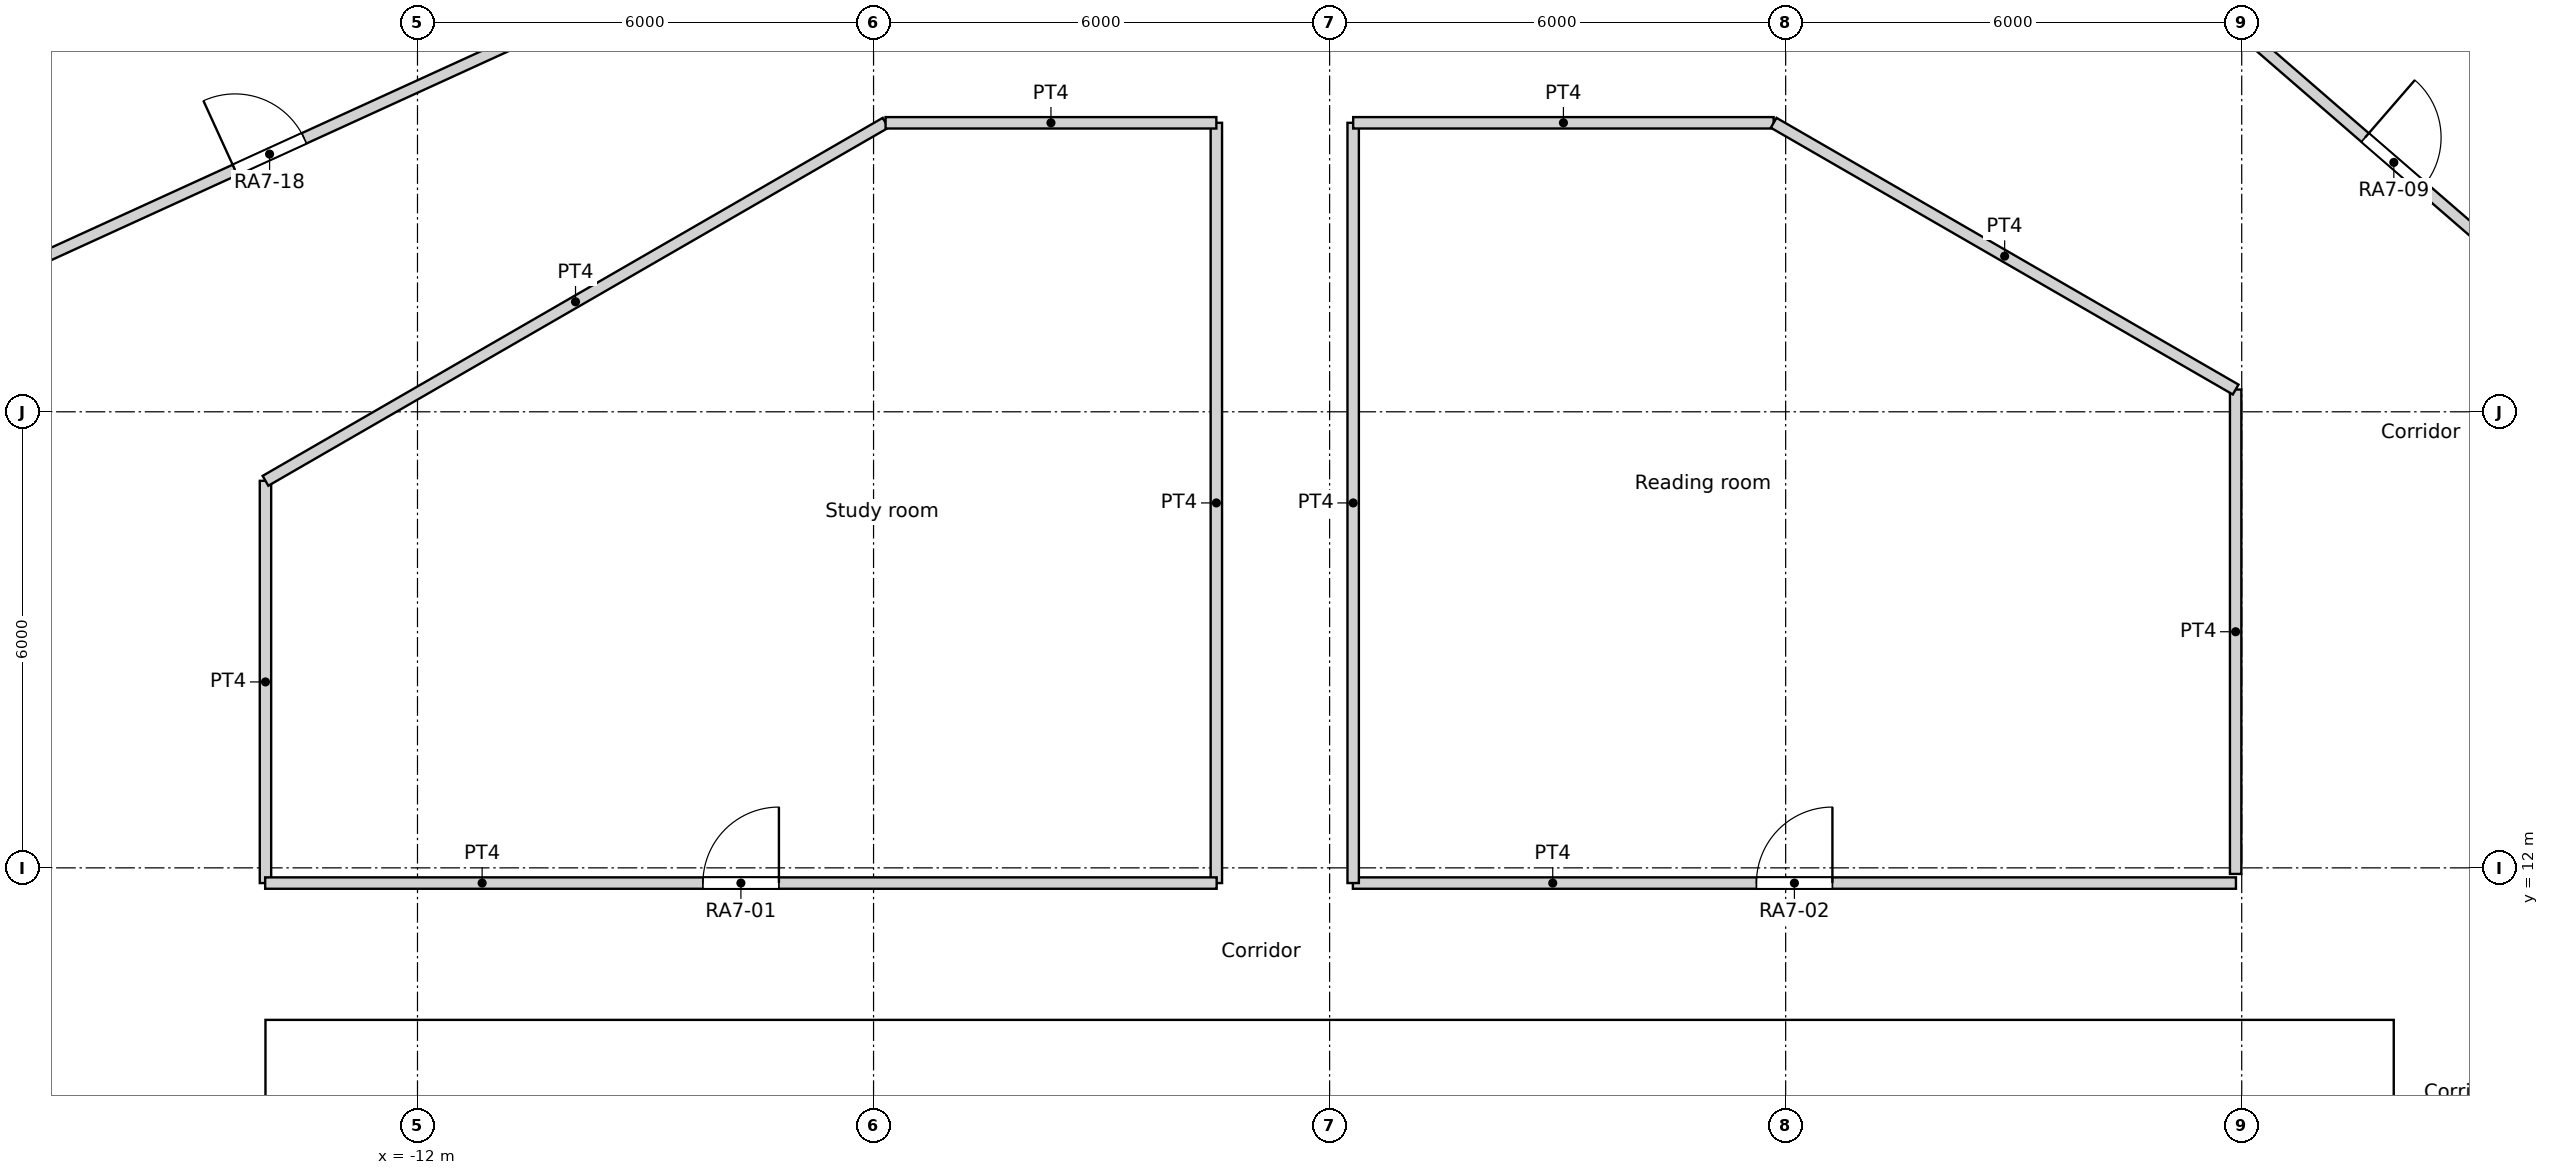
"""IFC4 building model, lengths in metres.
Left out: names, types, materials, properties, quantities, classifications, styles, units other than length and angle.
Written with IfcOpenShell. Run it as: python <this file> out.ifc"""

import sys

from ifc_helpers import new_model, si_unit, direction, frame, frame_2d, origin, origin_2d, place, context, subcontext, project, spatial, rectangle, circle, extrude, element, fill, save


model = new_model("IFC4")
c1 = context("Model", 3, precision=1e-05, world=origin(), true_north=direction((0.0, 1.0)))
c2 = subcontext(c1, "Body", "Model", "MODEL_VIEW")
j1 = project(units=[si_unit("LENGTHUNIT", "METRE"), si_unit("PLANEANGLEUNIT", "RADIAN")], contexts=[c1])
p1 = place(None, origin())
s1 = spatial("IfcSite", under=j1, at=p1, CompositionType="ELEMENT")
p2 = place(p1, origin())
s2 = spatial("IfcBuilding", under=s1, at=p2, CompositionType="ELEMENT")
p3 = place(p2, frame((0.0, 0.0, 93.0)))
s3 = spatial("IfcBuildingStorey", under=s2, at=p3, CompositionType="ELEMENT", Elevation=93.0)
for number, where, z_axis, x_axis in (
    (1, (14.659, 19.69, 0.0), (0.0, 0.0, 1.0), (1.0, 0.0, 0.0)),
    (2, (9.723, 22.54, 0.0), (0.0, 0.0, 1.0), (1.0, 0.0, 0.0)),
    (3, (-12.274, 21.259, 0.0), (0.0, 0.0, 1.0), (1.0, 0.0, 0.0)),
    (4, (-16.846, 17.855, 0.0), (0.0, 0.0, 1.0), (1.0, 0.0, 0.0)),
):
    element("IfcColumn", number, at=place(p3, frame(where, z_axis=z_axis, x_axis=x_axis)), inside=s3, PredefinedType="COLUMN", context=c2, shape_type="SweptSolid", body=[
        extrude(circle(Radius=0.65, at=origin_2d()), origin(), (0.0, 0.0, 1.0), 3.6),
    ])
for number, where, z_axis, x_axis in (
    (5, (15.552, 10.603, 0.0), (0.0, 0.0, 1.0), (1.0, 0.0, 0.0)),
    (6, (11.735, 14.716, 0.0), (0.0, 0.0, 1.0), (1.0, 0.0, 0.0)),
    (7, (6.876, 17.521, 0.0), (0.0, 0.0, 1.0), (1.0, 0.0, 0.0)),
    (8, (1.406, 18.77, 0.0), (0.0, 0.0, 1.0), (1.0, 0.0, 0.0)),
    (9, (-4.188, 18.35, 0.0), (0.0, 0.0, 1.0), (1.0, 0.0, 0.0)),
    (10, (-9.411, 16.301, 0.0), (0.0, 0.0, 1.0), (1.0, 0.0, 0.0)),
    (11, (-13.798, 12.802, 0.0), (0.0, 0.0, 1.0), (1.0, 0.0, 0.0)),
):
    element("IfcColumn", number, at=place(p3, frame(where, z_axis=z_axis, x_axis=x_axis)), inside=s3, PredefinedType="COLUMN", context=c2, shape_type="SweptSolid", body=[
        extrude(circle(Radius=0.7, at=origin_2d()), origin(), (0.0, 0.0, 1.0), 3.6),
    ])
p4 = place(p3, frame((-14.0, 9.4, 0.0), z_axis=(0.0, 0.0, 1.0), x_axis=(1.0, 0.0, 0.0)))
e12 = element("IfcWall", 12, at=p4, inside=s3, PredefinedType="SOLIDWALL", context=c2, shape_type="SweptSolid", body=[
    extrude(rectangle(XDim=28.0, YDim=1.2, at=frame_2d((14.0, 0.0))), origin(), (0.0, 0.0, 1.0), 3.6),
])
p5 = place(p4, frame((9.8, 0.0, 0.0)))
e13 = element("IfcOpeningElement", 13, at=p5, cuts=e12, PredefinedType="OPENING", context=c2, shape_type="SweptSolid", body=[
    extrude(rectangle(XDim=1.8, YDim=2.1, at=frame_2d((0.9, 1.05))), frame((0.0, 0.6, 0.0), z_axis=(0.0, -1.0, 0.0), x_axis=(1.0, 0.0, 0.0)), (0.0, 0.0, 1.0), 1.2),
])
p6 = place(p3, frame((-14.004, 11.8, 0.0), z_axis=(0.0, 0.0, 1.0), x_axis=(1.0, 0.0, 0.0)))
e14 = element("IfcWall", 14, at=p6, inside=s3, PredefinedType="PARTITIONING", context=c2, shape_type="SweptSolid", body=[
    extrude(rectangle(XDim=12.518, YDim=0.15, at=frame_2d((6.259, 0.0))), origin(), (0.0, 0.0, 1.0), 3.15),
])
p7 = place(p6, frame((5.759, 0.0, 0.0)))
e15 = element("IfcOpeningElement", 15, at=p7, cuts=e14, PredefinedType="OPENING", context=c2, shape_type="SweptSolid", body=[
    extrude(rectangle(XDim=1.0, YDim=2.04, at=frame_2d((0.5, 1.02))), frame((0.0, 0.075, 0.0), z_axis=(0.0, -1.0, 0.0), x_axis=(1.0, 0.0, 0.0)), (0.0, 0.0, 1.0), 0.15),
])
p8 = place(p3, frame((0.306, 11.8, 0.0), z_axis=(0.0, 0.0, 1.0), x_axis=(1.0, 0.0, 0.0)))
e16 = element("IfcWall", 16, at=p8, inside=s3, PredefinedType="PARTITIONING", context=c2, shape_type="SweptSolid", body=[
    extrude(rectangle(XDim=11.618, YDim=0.15, at=frame_2d((5.809, 0.0))), origin(), (0.0, 0.0, 1.0), 3.15),
])
p9 = place(p8, frame((5.309, 0.0, 0.0)))
e17 = element("IfcOpeningElement", 17, at=p9, cuts=e16, PredefinedType="OPENING", context=c2, shape_type="SweptSolid", body=[
    extrude(rectangle(XDim=1.0, YDim=2.04, at=frame_2d((0.5, 1.02))), frame((0.0, 0.075, 0.0), z_axis=(0.0, -1.0, 0.0), x_axis=(1.0, 0.0, 0.0)), (0.0, 0.0, 1.0), 0.15),
])
p10 = place(p3, frame((10.932, 23.939, 0.0), z_axis=(0.0, 0.0, 1.0), x_axis=(0.755823777664, -0.654775088956, 0.0)))
e18 = element("IfcWall", 18, at=p10, inside=s3, PredefinedType="PARTITIONING", context=c2, shape_type="SweptSolid", body=[
    extrude(rectangle(XDim=14.83, YDim=0.15, at=frame_2d((7.415, 0.0))), origin(), (0.0, 0.0, 1.0), 3.15),
])
p11 = place(p10, frame((3.56, 0.0, 0.0)))
e19 = element("IfcOpeningElement", 19, at=p11, cuts=e18, PredefinedType="OPENING", context=c2, shape_type="SweptSolid", body=[
    extrude(rectangle(XDim=1.0, YDim=2.04, at=frame_2d((0.5, 1.02))), frame((0.0, 0.075, 0.0), z_axis=(0.0, -1.0, 0.0), x_axis=(1.0, 0.0, 0.0)), (0.0, 0.0, 1.0), 0.15),
])
p12 = place(p3, frame((-1.49, 11.8, 0.0), z_axis=(0.0, 0.0, 1.0), x_axis=(0.0, 1.0, 0.0)))
e20 = element("IfcWall", 20, at=p12, inside=s3, PredefinedType="PARTITIONING", context=c2, shape_type="SweptSolid", body=[
    extrude(rectangle(XDim=10.002, YDim=0.15, at=frame_2d((5.001, 0.0))), origin(), (0.0, 0.0, 1.0), 3.15),
])
p13 = place(p3, frame((-5.842, 21.802, 0.0), z_axis=(0.0, 0.0, 1.0), x_axis=(1.0, 0.0, 0.0)))
e21 = element("IfcWall", 21, at=p13, inside=s3, PredefinedType="PARTITIONING", context=c2, shape_type="SweptSolid", body=[
    extrude(rectangle(XDim=4.352, YDim=0.15, at=frame_2d((2.176, 0.0))), origin(), (0.0, 0.0, 1.0), 3.15),
])
p14 = place(p3, frame((-14.0, 17.092, 0.0), z_axis=(0.0, 0.0, 1.0), x_axis=(0.86602719091, 0.499996904595, 0.0)))
e22 = element("IfcWall", 22, at=p14, inside=s3, PredefinedType="PARTITIONING", context=c2, shape_type="SweptSolid", body=[
    extrude(rectangle(XDim=9.42, YDim=0.15, at=frame_2d((4.71, 0.0))), origin(), (0.0, 0.0, 1.0), 3.15),
])
p15 = place(p3, frame((-14.0, 11.8, 0.0), z_axis=(0.0, 0.0, 1.0), x_axis=(0.0, 1.0, 0.0)))
e23 = element("IfcWall", 23, at=p15, inside=s3, PredefinedType="PARTITIONING", context=c2, shape_type="SweptSolid", body=[
    extrude(rectangle(XDim=5.292, YDim=0.15, at=frame_2d((2.646, 0.0))), origin(), (0.0, 0.0, 1.0), 3.15),
])
p16 = place(p3, frame((11.92, 11.92, 0.0), z_axis=(0.0, 0.0, 1.0), x_axis=(0.0, 1.0, 0.0)))
e24 = element("IfcWall", 24, at=p16, inside=s3, PredefinedType="PARTITIONING", context=c2, shape_type="SweptSolid", body=[
    extrude(rectangle(XDim=6.373, YDim=0.15, at=frame_2d((3.187, 0.0))), origin(), (0.0, 0.0, 1.0), 3.15),
])
p17 = place(p3, frame((5.842, 21.802, 0.0), z_axis=(0.0, 0.0, 1.0), x_axis=(0.866027436592, -0.499996479058, 0.0)))
e25 = element("IfcWall", 25, at=p17, inside=s3, PredefinedType="PARTITIONING", context=c2, shape_type="SweptSolid", body=[
    extrude(rectangle(XDim=7.018, YDim=0.15, at=frame_2d((3.509, 0.0))), origin(), (0.0, 0.0, 1.0), 3.15),
])
p18 = place(p3, frame((0.31, 21.802, 0.0), z_axis=(0.0, 0.0, 1.0), x_axis=(1.0, 0.0, 0.0)))
e26 = element("IfcWall", 26, at=p18, inside=s3, PredefinedType="PARTITIONING", context=c2, shape_type="SweptSolid", body=[
    extrude(rectangle(XDim=5.532, YDim=0.15, at=frame_2d((2.766, 0.0))), origin(), (0.0, 0.0, 1.0), 3.15),
])
p19 = place(p3, frame((0.31, 11.8, 0.0), z_axis=(0.0, 0.0, 1.0), x_axis=(0.0, 1.0, 0.0)))
e27 = element("IfcWall", 27, at=p19, inside=s3, PredefinedType="PARTITIONING", context=c2, shape_type="SweptSolid", body=[
    extrude(rectangle(XDim=10.002, YDim=0.15, at=frame_2d((5.001, 0.0))), origin(), (0.0, 0.0, 1.0), 3.15),
])
p20 = place(p3, frame((-17.234, 19.888, 0.0), z_axis=(0.0, 0.0, 1.0), x_axis=(0.90953867323, 0.415619299238, 0.0)))
e28 = element("IfcWall", 28, at=p20, inside=s3, PredefinedType="PARTITIONING", context=c2, shape_type="SweptSolid", body=[
    extrude(rectangle(XDim=14.829, YDim=0.15, at=frame_2d((7.415, 0.0))), origin(), (0.0, 0.0, 1.0), 3.15),
])
p21 = place(p20, frame((12.797, 0.0, 0.0)))
e29 = element("IfcOpeningElement", 29, at=p21, cuts=e28, PredefinedType="OPENING", context=c2, shape_type="SweptSolid", body=[
    extrude(rectangle(XDim=1.0, YDim=2.1, at=frame_2d((0.5, 1.05))), frame((0.0, 0.075, 0.0), z_axis=(0.0, -1.0, 0.0), x_axis=(1.0, 0.0, 0.0)), (0.0, 0.0, 1.0), 0.15),
])
p22 = place(p20, frame((3.115, 0.0, 0.0)))
e30 = element("IfcOpeningElement", 30, at=p22, cuts=e28, PredefinedType="OPENING", context=c2, shape_type="SweptSolid", body=[
    extrude(rectangle(XDim=1.0, YDim=2.04, at=frame_2d((0.5, 1.02))), frame((0.0, 0.075, 0.0), z_axis=(0.0, -1.0, 0.0), x_axis=(1.0, 0.0, 0.0)), (0.0, 0.0, 1.0), 0.15),
])
p23 = place(p5, origin())
e31 = element("IfcDoor", 31, at=p23, inside=s3, OperationType="DOUBLE_DOOR_SINGLE_SWING", PredefinedType="DOOR", context=c2, shape_type="SweptSolid", body=[
    extrude(rectangle(XDim=1.8, YDim=2.1, at=frame_2d((0.9, 1.05))), frame((0.0, 0.025, 0.0), z_axis=(0.0, -1.0, 0.0), x_axis=(1.0, 0.0, 0.0)), (0.0, 0.0, 1.0), 0.05),
])
fill(e13, e31)
p24 = place(p7, origin())
e32 = element("IfcDoor", 32, at=p24, inside=s3, OperationType="SINGLE_SWING_RIGHT", PredefinedType="DOOR", context=c2, shape_type="SweptSolid", body=[
    extrude(rectangle(XDim=1.0, YDim=2.04, at=frame_2d((0.5, 1.02))), frame((0.0, 0.025, 0.0), z_axis=(0.0, -1.0, 0.0), x_axis=(1.0, 0.0, 0.0)), (0.0, 0.0, 1.0), 0.05),
])
fill(e15, e32)
p25 = place(p9, origin())
e33 = element("IfcDoor", 33, at=p25, inside=s3, OperationType="SINGLE_SWING_RIGHT", PredefinedType="DOOR", context=c2, shape_type="SweptSolid", body=[
    extrude(rectangle(XDim=1.0, YDim=2.04, at=frame_2d((0.5, 1.02))), frame((0.0, 0.025, 0.0), z_axis=(0.0, -1.0, 0.0), x_axis=(1.0, 0.0, 0.0)), (0.0, 0.0, 1.0), 0.05),
])
fill(e17, e33)
p26 = place(p11, origin())
e34 = element("IfcDoor", 34, at=p26, inside=s3, OperationType="SINGLE_SWING_LEFT", PredefinedType="DOOR", context=c2, shape_type="SweptSolid", body=[
    extrude(rectangle(XDim=1.0, YDim=2.04, at=frame_2d((0.5, 1.02))), frame((0.0, 0.025, 0.0), z_axis=(0.0, -1.0, 0.0), x_axis=(1.0, 0.0, 0.0)), (0.0, 0.0, 1.0), 0.05),
])
fill(e19, e34)
p27 = place(p22, origin())
e35 = element("IfcDoor", 35, at=p27, inside=s3, OperationType="SINGLE_SWING_LEFT", PredefinedType="DOOR", context=c2, shape_type="SweptSolid", body=[
    extrude(rectangle(XDim=1.0, YDim=2.04, at=frame_2d((0.5, 1.02))), frame((0.0, 0.025, 0.0), z_axis=(0.0, -1.0, 0.0), x_axis=(1.0, 0.0, 0.0)), (0.0, 0.0, 1.0), 0.05),
])
fill(e30, e35)
save(model, sys.argv[1])
